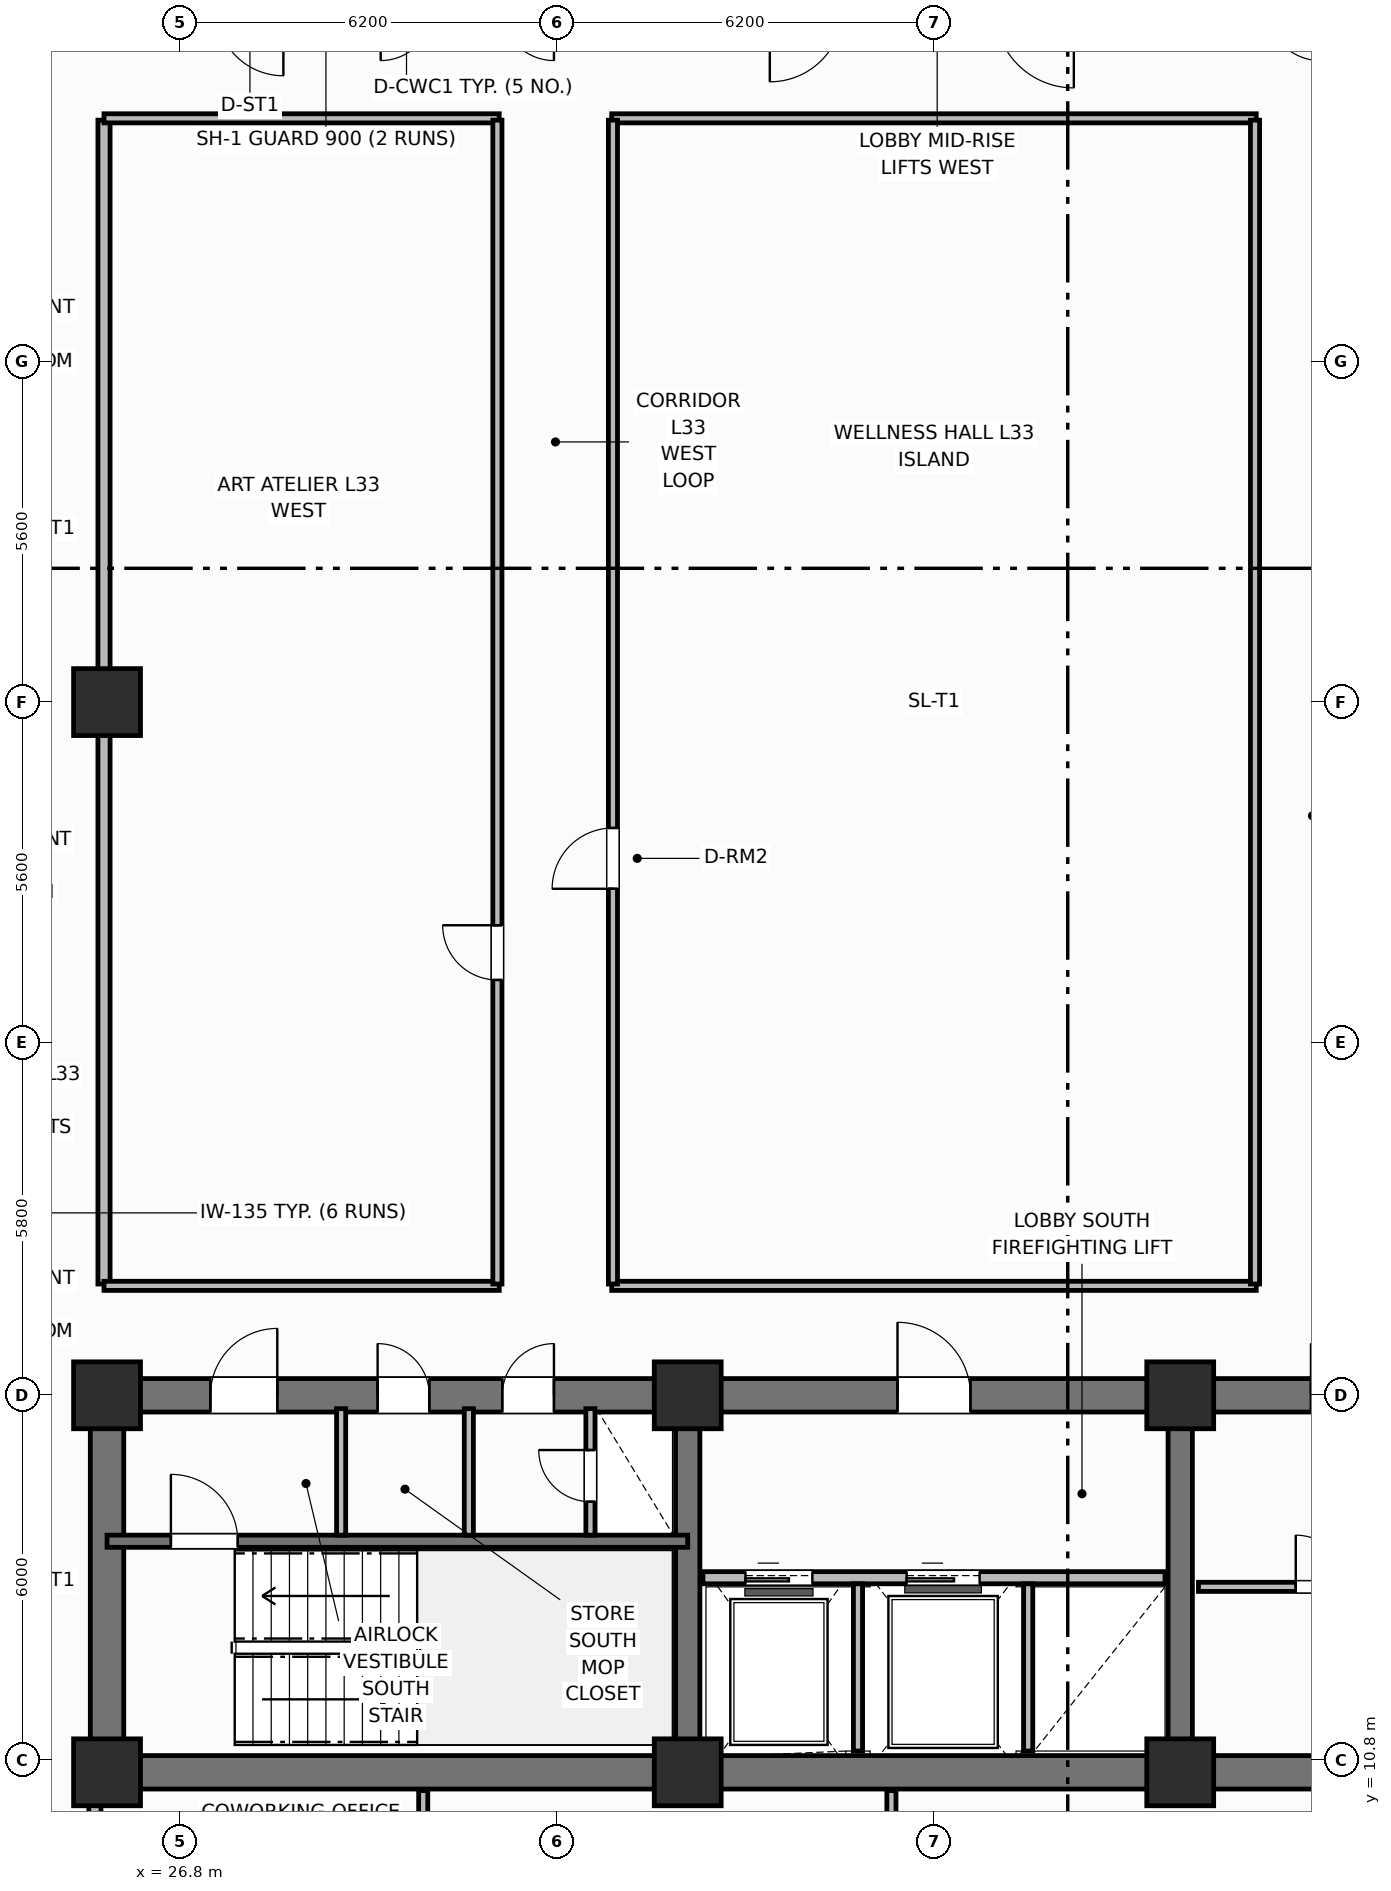
"""IFC4 building model, lengths in metres.
Left out: names, types, materials, properties, quantities, classifications, styles, units other than length and angle.
Written with IfcOpenShell. Run it as: python <this file> out.ifc"""

import sys

from ifc_helpers import new_model, si_unit, direction, frame, frame_2d, origin, origin_2d, place, context, subcontext, project, spatial, rectangle, extrude, element, fill, save


model = new_model("IFC4")
c1 = context("Model", 3, precision=1e-05, world=origin(), true_north=direction((0.0, 1.0)))
c2 = subcontext(c1, "Body", "Model", "MODEL_VIEW")
j1 = project(units=[si_unit("LENGTHUNIT", "METRE"), si_unit("PLANEANGLEUNIT", "RADIAN")], contexts=[c1])
p1 = place(None, origin())
s1 = spatial("IfcSite", under=j1, at=p1, CompositionType="ELEMENT")
p2 = place(p1, origin())
s2 = spatial("IfcBuilding", under=s1, at=p2, CompositionType="ELEMENT")
p3 = place(p2, frame((0.0, 0.0, 132.7)))
s3 = spatial("IfcBuildingStorey", under=s2, at=p3, CompositionType="ELEMENT", Elevation=132.7)
p4 = place(p3, frame((52.8, 10.6, 0.0), z_axis=(0.0, 0.0, 1.0), x_axis=(-1.0, 0.0, 0.0)))
e1 = element("IfcWall", 1, at=p4, inside=s3, PredefinedType="SHEAR", context=c2, shape_type="SweptSolid", body=[
    extrude(rectangle(XDim=27.2, YDim=0.55, at=frame_2d((13.6, 0.0))), origin(), (0.0, 0.0, 1.0), 3.7),
])
p5 = place(p3, frame((25.6, 10.875, 0.0), z_axis=(0.0, 0.0, 1.0), x_axis=(0.0, 1.0, 0.0)))
e2 = element("IfcWall", 2, at=p5, inside=s3, PredefinedType="SHEAR", context=c2, shape_type="SweptSolid", body=[
    extrude(rectangle(XDim=5.65, YDim=0.55, at=frame_2d((2.825, 0.0))), origin(), (0.0, 0.0, 1.0), 3.7),
])
p6 = place(p3, frame((25.6, 16.8, 0.0), z_axis=(0.0, 0.0, 1.0), x_axis=(1.0, 0.0, 0.0)))
e3 = element("IfcWall", 3, at=p6, inside=s3, PredefinedType="SHEAR", context=c2, shape_type="SweptSolid", body=[
    extrude(rectangle(XDim=27.2, YDim=0.55, at=frame_2d((13.6, 0.0))), origin(), (0.0, 0.0, 1.0), 3.7),
])
p7 = place(p6, frame((1.7, 0.0, 0.0)))
e4 = element("IfcOpeningElement", 4, at=p7, cuts=e3, PredefinedType="OPENING", context=c2, shape_type="SweptSolid", body=[
    extrude(rectangle(XDim=1.1, YDim=2.15, at=frame_2d((0.55, 1.075))), frame((0.0, 0.285, 0.0), z_axis=(0.0, -1.0, 0.0), x_axis=(1.0, 0.0, 0.0)), (0.0, 0.0, 1.0), 0.57),
])
p8 = place(p6, frame((4.45, 0.0, 0.0)))
e5 = element("IfcOpeningElement", 5, at=p8, cuts=e3, PredefinedType="OPENING", context=c2, shape_type="SweptSolid", body=[
    extrude(rectangle(XDim=0.85, YDim=2.1, at=frame_2d((0.425, 1.05))), frame((0.0, 0.285, 0.0), z_axis=(0.0, -1.0, 0.0), x_axis=(1.0, 0.0, 0.0)), (0.0, 0.0, 1.0), 0.57),
])
p9 = place(p6, frame((6.5, 0.0, 0.0)))
e6 = element("IfcOpeningElement", 6, at=p9, cuts=e3, PredefinedType="OPENING", context=c2, shape_type="SweptSolid", body=[
    extrude(rectangle(XDim=0.85, YDim=2.1, at=frame_2d((0.425, 1.05))), frame((0.0, 0.285, 0.0), z_axis=(0.0, -1.0, 0.0), x_axis=(1.0, 0.0, 0.0)), (0.0, 0.0, 1.0), 0.57),
])
p10 = place(p6, frame((13.0, 0.0, 0.0)))
e7 = element("IfcOpeningElement", 7, at=p10, cuts=e3, PredefinedType="OPENING", context=c2, shape_type="SweptSolid", body=[
    extrude(rectangle(XDim=1.2, YDim=2.15, at=frame_2d((0.6, 1.075))), frame((0.0, 0.285, 0.0), z_axis=(0.0, -1.0, 0.0), x_axis=(1.0, 0.0, 0.0)), (0.0, 0.0, 1.0), 0.57),
])
p11 = place(p6, frame((19.8, 0.0, 0.0)))
e8 = element("IfcOpeningElement", 8, at=p11, cuts=e3, PredefinedType="OPENING", context=c2, shape_type="SweptSolid", body=[
    extrude(rectangle(XDim=0.85, YDim=2.1, at=frame_2d((0.425, 1.05))), frame((0.0, 0.285, 0.0), z_axis=(0.0, -1.0, 0.0), x_axis=(1.0, 0.0, 0.0)), (0.0, 0.0, 1.0), 0.57),
])
p12 = place(p6, frame((24.2, 0.0, 0.0)))
e9 = element("IfcOpeningElement", 9, at=p12, cuts=e3, PredefinedType="OPENING", context=c2, shape_type="SweptSolid", body=[
    extrude(rectangle(XDim=0.85, YDim=2.1, at=frame_2d((0.425, 1.05))), frame((0.0, 0.285, 0.0), z_axis=(0.0, -1.0, 0.0), x_axis=(1.0, 0.0, 0.0)), (0.0, 0.0, 1.0), 0.57),
])
for number, where, z_axis, x_axis in (
    (10, (35.15, 10.875, 0.0), (0.0, 0.0, 1.0), (0.0, 1.0, 0.0)),
    (11, (43.25, 10.875, 0.0), (0.0, 0.0, 1.0), (0.0, 1.0, 0.0)),
):
    element("IfcWall", number, at=place(p3, frame(where, z_axis=z_axis, x_axis=x_axis)), inside=s3, PredefinedType="SHEAR", context=c2, shape_type="SweptSolid", body=[
        extrude(rectangle(XDim=5.65, YDim=0.4, at=frame_2d((2.825, 0.0))), origin(), (0.0, 0.0, 1.0), 3.7),
    ])
for number, where, z_axis, x_axis in (
    (12, (25.6, 10.6, 0.0), (0.0, 0.0, 1.0), (1.0, 0.0, 0.0)),
    (13, (25.6, 16.8, 0.0), (0.0, 0.0, 1.0), (1.0, 0.0, 0.0)),
    (14, (35.15, 10.6, 0.0), (0.0, 0.0, 1.0), (1.0, 0.0, 0.0)),
    (15, (35.15, 16.8, 0.0), (0.0, 0.0, 1.0), (1.0, 0.0, 0.0)),
    (16, (43.25, 10.6, 0.0), (0.0, 0.0, 1.0), (1.0, 0.0, 0.0)),
    (17, (43.25, 16.8, 0.0), (0.0, 0.0, 1.0), (1.0, 0.0, 0.0)),
    (18, (25.6, 28.2, 0.0), (0.0, 0.0, 1.0), (1.0, 0.0, 0.0)),
):
    element("IfcColumn", number, at=place(p3, frame(where, z_axis=z_axis, x_axis=x_axis)), inside=s3, PredefinedType="COLUMN", context=c2, shape_type="SweptSolid", body=[
        extrude(rectangle(XDim=1.1, YDim=1.1, at=origin_2d()), origin(), (0.0, 0.0, 1.0), 3.7),
    ])
p13 = place(p3, frame((25.6, 14.4, 0.0), z_axis=(0.0, 0.0, 1.0), x_axis=(1.0, 0.0, 0.0)))
e19 = element("IfcWall", 19, at=p13, inside=s3, PredefinedType="SHEAR", context=c2, shape_type="SweptSolid", body=[
    extrude(rectangle(XDim=9.55, YDim=0.2, at=frame_2d((4.775, 0.0))), origin(), (0.0, 0.0, 1.0), 3.7),
])
p14 = place(p13, frame((1.05, 0.0, 0.0)))
e20 = element("IfcOpeningElement", 20, at=p14, cuts=e19, PredefinedType="OPENING", context=c2, shape_type="SweptSolid", body=[
    extrude(rectangle(XDim=1.1, YDim=2.15, at=frame_2d((0.55, 1.075))), frame((0.0, 0.11, 0.0), z_axis=(0.0, -1.0, 0.0), x_axis=(1.0, 0.0, 0.0)), (0.0, 0.0, 1.0), 0.22),
])
for number, where, z_axis, x_axis in (
    (21, (29.45, 14.5, 0.0), (0.0, 0.0, 1.0), (0.0, 1.0, 0.0)),
    (22, (31.55, 14.5, 0.0), (0.0, 0.0, 1.0), (0.0, 1.0, 0.0)),
):
    element("IfcWall", number, at=place(p3, frame(where, z_axis=z_axis, x_axis=x_axis)), inside=s3, PredefinedType="PARTITIONING", context=c2, shape_type="SweptSolid", body=[
        extrude(rectangle(XDim=2.08, YDim=0.15, at=frame_2d((1.04, 0.0))), origin(), (0.0, 0.0, 1.0), 2.49),
    ])
p15 = place(p3, frame((33.55, 14.5, 0.0), z_axis=(0.0, 0.0, 1.0), x_axis=(0.0, 1.0, 0.0)))
e23 = element("IfcWall", 23, at=p15, inside=s3, PredefinedType="PARTITIONING", context=c2, shape_type="SweptSolid", body=[
    extrude(rectangle(XDim=2.08, YDim=0.15, at=frame_2d((1.04, 0.0))), origin(), (0.0, 0.0, 1.0), 2.49),
])
p16 = place(p15, frame((0.55, 0.0, 0.0)))
e24 = element("IfcOpeningElement", 24, at=p16, cuts=e23, PredefinedType="OPENING", context=c2, shape_type="SweptSolid", body=[
    extrude(rectangle(XDim=0.85, YDim=2.05, at=frame_2d((0.425, 1.025))), frame((0.0, 0.085, 0.0), z_axis=(0.0, -1.0, 0.0), x_axis=(1.0, 0.0, 0.0)), (0.0, 0.0, 1.0), 0.17),
])
p17 = place(p3, frame((35.4, 13.8, 0.0), z_axis=(0.0, 0.0, 1.0), x_axis=(1.0, 0.0, 0.0)))
e25 = element("IfcWall", 25, at=p17, inside=s3, PredefinedType="PARTITIONING", context=c2, shape_type="SweptSolid", body=[
    extrude(rectangle(XDim=7.6, YDim=0.2, at=frame_2d((3.8, 0.0))), origin(), (0.0, 0.0, 1.0), 2.26),
])
p18 = place(p17, frame((0.7, 0.0, 0.0)))
e26 = element("IfcOpeningElement", 26, at=p18, cuts=e25, PredefinedType="OPENING", context=c2, shape_type="SweptSolid", body=[
    extrude(rectangle(XDim=1.1, YDim=2.15, at=frame_2d((0.55, 1.075))), frame((0.0, 0.11, 0.0), z_axis=(0.0, -1.0, 0.0), x_axis=(1.0, 0.0, 0.0)), (0.0, 0.0, 1.0), 0.22),
])
p19 = place(p17, frame((3.35, 0.0, 0.0)))
e27 = element("IfcOpeningElement", 27, at=p19, cuts=e25, PredefinedType="OPENING", context=c2, shape_type="SweptSolid", body=[
    extrude(rectangle(XDim=1.2, YDim=2.15, at=frame_2d((0.6, 1.075))), frame((0.0, 0.11, 0.0), z_axis=(0.0, -1.0, 0.0), x_axis=(1.0, 0.0, 0.0)), (0.0, 0.0, 1.0), 0.22),
])
for number, where, z_axis, x_axis in (
    (28, (37.95, 10.95, 0.0), (0.0, 0.0, 1.0), (0.0, 1.0, 0.0)),
    (29, (40.75, 10.95, 0.0), (0.0, 0.0, 1.0), (0.0, 1.0, 0.0)),
):
    element("IfcWall", number, at=place(p3, frame(where, z_axis=z_axis, x_axis=x_axis)), inside=s3, PredefinedType="PARTITIONING", context=c2, shape_type="SweptSolid", body=[
        extrude(rectangle(XDim=2.75, YDim=0.15, at=frame_2d((1.375, 0.0))), origin(), (0.0, 0.0, 1.0), 2.49),
    ])
p20 = place(p3, frame((43.55, 13.65, 0.0), z_axis=(0.0, 0.0, 1.0), x_axis=(1.0, 0.0, 0.0)))
e30 = element("IfcWall", 30, at=p20, inside=s3, PredefinedType="PARTITIONING", context=c2, shape_type="SweptSolid", body=[
    extrude(rectangle(XDim=4.4, YDim=0.15, at=frame_2d((2.2, 0.0))), origin(), (0.0, 0.0, 1.0), 2.49),
])
p21 = place(p20, frame((1.6, 0.0, 0.0)))
e31 = element("IfcOpeningElement", 31, at=p21, cuts=e30, PredefinedType="OPENING", context=c2, shape_type="SweptSolid", body=[
    extrude(rectangle(XDim=0.85, YDim=2.1, at=frame_2d((0.425, 1.05))), frame((0.0, 0.085, 0.0), z_axis=(0.0, -1.0, 0.0), x_axis=(1.0, 0.0, 0.0)), (0.0, 0.0, 1.0), 0.17),
])
p22 = place(p3, frame((25.55, 18.63, 0.0), z_axis=(0.0, 0.0, 1.0), x_axis=(0.0, 1.0, 0.0)))
e32 = element("IfcWall", 32, at=p22, inside=s3, PredefinedType="PARTITIONING", context=c2, shape_type="SweptSolid", body=[
    extrude(rectangle(XDim=19.14, YDim=0.2, at=frame_2d((9.57, 0.0))), origin(), (0.0, 0.0, 1.0), 2.49),
])
for number, where, z_axis, x_axis in (
    (33, (25.55, 18.6, 0.0), (0.0, 0.0, 1.0), (1.0, 0.0, 0.0)),
    (34, (25.55, 37.8, 0.0), (0.0, 0.0, 1.0), (1.0, 0.0, 0.0)),
):
    element("IfcWall", number, at=place(p3, frame(where, z_axis=z_axis, x_axis=x_axis)), inside=s3, PredefinedType="PARTITIONING", context=c2, shape_type="SweptSolid", body=[
        extrude(rectangle(XDim=6.5, YDim=0.15, at=frame_2d((3.25, 0.0))), origin(), (0.0, 0.0, 1.0), 2.49),
    ])
for number, where, z_axis, x_axis in (
    (35, (33.9, 18.6, 0.0), (0.0, 0.0, 1.0), (1.0, 0.0, 0.0)),
    (36, (33.9, 37.8, 0.0), (0.0, 0.0, 1.0), (1.0, 0.0, 0.0)),
):
    element("IfcWall", number, at=place(p3, frame(where, z_axis=z_axis, x_axis=x_axis)), inside=s3, PredefinedType="PARTITIONING", context=c2, shape_type="SweptSolid", body=[
        extrude(rectangle(XDim=10.6, YDim=0.15, at=frame_2d((5.3, 0.0))), origin(), (0.0, 0.0, 1.0), 2.49),
    ])
p23 = place(p3, frame((32.02, 18.63, 0.0), z_axis=(0.0, 0.0, 1.0), x_axis=(0.0, 1.0, 0.0)))
e37 = element("IfcWall", 37, at=p23, inside=s3, PredefinedType="PARTITIONING", context=c2, shape_type="SweptSolid", body=[
    extrude(rectangle(XDim=19.14, YDim=0.15, at=frame_2d((9.57, 0.0))), origin(), (0.0, 0.0, 1.0), 2.49),
])
p24 = place(p23, frame((5.0, 0.0, 0.0)))
e38 = element("IfcOpeningElement", 38, at=p24, cuts=e37, PredefinedType="OPENING", context=c2, shape_type="SweptSolid", body=[
    extrude(rectangle(XDim=0.9, YDim=2.1, at=frame_2d((0.45, 1.05))), frame((0.0, 0.085, 0.0), z_axis=(0.0, -1.0, 0.0), x_axis=(1.0, 0.0, 0.0)), (0.0, 0.0, 1.0), 0.17),
])
p25 = place(p3, frame((33.92, 18.63, 0.0), z_axis=(0.0, 0.0, 1.0), x_axis=(0.0, 1.0, 0.0)))
e39 = element("IfcWall", 39, at=p25, inside=s3, PredefinedType="PARTITIONING", context=c2, shape_type="SweptSolid", body=[
    extrude(rectangle(XDim=19.14, YDim=0.15, at=frame_2d((9.57, 0.0))), origin(), (0.0, 0.0, 1.0), 2.49),
])
p26 = place(p25, frame((6.5, 0.0, 0.0)))
e40 = element("IfcOpeningElement", 40, at=p26, cuts=e39, PredefinedType="OPENING", context=c2, shape_type="SweptSolid", body=[
    extrude(rectangle(XDim=1.0, YDim=2.15, at=frame_2d((0.5, 1.075))), frame((0.0, 0.085, 0.0), z_axis=(0.0, -1.0, 0.0), x_axis=(1.0, 0.0, 0.0)), (0.0, 0.0, 1.0), 0.17),
])
p27 = place(p3, frame((44.48, 18.63, 0.0), z_axis=(0.0, 0.0, 1.0), x_axis=(0.0, 1.0, 0.0)))
e41 = element("IfcWall", 41, at=p27, inside=s3, PredefinedType="PARTITIONING", context=c2, shape_type="SweptSolid", body=[
    extrude(rectangle(XDim=19.14, YDim=0.15, at=frame_2d((9.57, 0.0))), origin(), (0.0, 0.0, 1.0), 2.49),
])
p28 = place(p3, frame((30.8, 4.97, 0.0), z_axis=(0.0, 0.0, 1.0), x_axis=(0.0, 1.0, 0.0)))
e42 = element("IfcWall", 42, at=p28, inside=s3, PredefinedType="PARTITIONING", context=c2, shape_type="SweptSolid", body=[
    extrude(rectangle(XDim=5.33, YDim=0.15, at=frame_2d((2.665, 0.0))), origin(), (0.0, 0.0, 1.0), 2.49),
])
p29 = place(p28, frame((1.85, 0.0, 0.0)))
e43 = element("IfcOpeningElement", 43, at=p29, cuts=e42, PredefinedType="OPENING", context=c2, shape_type="SweptSolid", body=[
    extrude(rectangle(XDim=0.9, YDim=2.1, at=frame_2d((0.45, 1.05))), frame((0.0, 0.085, 0.0), z_axis=(0.0, -1.0, 0.0), x_axis=(1.0, 0.0, 0.0)), (0.0, 0.0, 1.0), 0.17),
])
p30 = place(p3, frame((38.5, 4.97, 0.0), z_axis=(0.0, 0.0, 1.0), x_axis=(0.0, 1.0, 0.0)))
e44 = element("IfcWall", 44, at=p30, inside=s3, PredefinedType="PARTITIONING", context=c2, shape_type="SweptSolid", body=[
    extrude(rectangle(XDim=5.33, YDim=0.15, at=frame_2d((2.665, 0.0))), origin(), (0.0, 0.0, 1.0), 2.49),
])
p31 = place(p3, frame((25.4, 6.17, 0.0), z_axis=(0.0, 0.0, 1.0), x_axis=(0.0, 1.0, 0.0)))
e45 = element("IfcWall", 45, at=p31, inside=s3, PredefinedType="PARTITIONING", context=c2, shape_type="SweptSolid", body=[
    extrude(rectangle(XDim=4.13, YDim=0.2, at=frame_2d((2.065, 0.0))), origin(), (0.0, 0.0, 1.0), 2.49),
])
p32 = place(p31, frame((0.65, 0.0, 0.0)))
e46 = element("IfcOpeningElement", 46, at=p32, cuts=e45, PredefinedType="OPENING", context=c2, shape_type="SweptSolid", body=[
    extrude(rectangle(XDim=0.9, YDim=2.1, at=frame_2d((0.45, 1.05))), frame((0.0, 0.11, 0.0), z_axis=(0.0, -1.0, 0.0), x_axis=(1.0, 0.0, 0.0)), (0.0, 0.0, 1.0), 0.22),
])
p33 = place(p14, origin())
e47 = element("IfcDoor", 47, at=p33, inside=s3, OperationType="SINGLE_SWING_LEFT", PredefinedType="DOOR", context=c2, shape_type="SweptSolid", body=[
    extrude(rectangle(XDim=1.1, YDim=2.15, at=frame_2d((0.55, 1.075))), frame((0.0, 0.025, 0.0), z_axis=(0.0, -1.0, 0.0), x_axis=(1.0, 0.0, 0.0)), (0.0, 0.0, 1.0), 0.05),
])
fill(e20, e47)
p34 = place(p16, origin())
e48 = element("IfcDoor", 48, at=p34, inside=s3, OperationType="SINGLE_SWING_RIGHT", PredefinedType="TRAPDOOR", context=c2, shape_type="SweptSolid", body=[
    extrude(rectangle(XDim=0.85, YDim=2.05, at=frame_2d((0.425, 1.025))), frame((0.0, 0.025, 0.0), z_axis=(0.0, -1.0, 0.0), x_axis=(1.0, 0.0, 0.0)), (0.0, 0.0, 1.0), 0.05),
])
fill(e24, e48)
p35 = place(p18, origin())
e49 = element("IfcDoor", 49, at=p35, inside=s3, OperationType="SLIDING_TO_LEFT", PredefinedType="DOOR", context=c2, shape_type="SweptSolid", body=[
    extrude(rectangle(XDim=1.1, YDim=2.15, at=frame_2d((0.55, 1.075))), frame((0.0, 0.025, 0.0), z_axis=(0.0, -1.0, 0.0), x_axis=(1.0, 0.0, 0.0)), (0.0, 0.0, 1.0), 0.05),
])
fill(e26, e49)
p36 = place(p19, origin())
e50 = element("IfcDoor", 50, at=p36, inside=s3, OperationType="SLIDING_TO_LEFT", PredefinedType="DOOR", context=c2, shape_type="SweptSolid", body=[
    extrude(rectangle(XDim=1.2, YDim=2.15, at=frame_2d((0.6, 1.075))), frame((0.0, 0.025, 0.0), z_axis=(0.0, -1.0, 0.0), x_axis=(1.0, 0.0, 0.0)), (0.0, 0.0, 1.0), 0.05),
])
fill(e27, e50)
p37 = place(p21, origin())
e51 = element("IfcDoor", 51, at=p37, inside=s3, OperationType="SINGLE_SWING_LEFT", PredefinedType="DOOR", context=c2, shape_type="SweptSolid", body=[
    extrude(rectangle(XDim=0.85, YDim=2.1, at=frame_2d((0.425, 1.05))), frame((0.0, 0.025, 0.0), z_axis=(0.0, -1.0, 0.0), x_axis=(1.0, 0.0, 0.0)), (0.0, 0.0, 1.0), 0.05),
])
fill(e31, e51)
p38 = place(p24, origin())
e52 = element("IfcDoor", 52, at=p38, inside=s3, OperationType="SINGLE_SWING_RIGHT", PredefinedType="DOOR", context=c2, shape_type="SweptSolid", body=[
    extrude(rectangle(XDim=0.9, YDim=2.1, at=frame_2d((0.45, 1.05))), frame((0.0, 0.025, 0.0), z_axis=(0.0, -1.0, 0.0), x_axis=(1.0, 0.0, 0.0)), (0.0, 0.0, 1.0), 0.05),
])
fill(e38, e52)
p39 = place(p26, origin())
e53 = element("IfcDoor", 53, at=p39, inside=s3, OperationType="SINGLE_SWING_LEFT", PredefinedType="DOOR", context=c2, shape_type="SweptSolid", body=[
    extrude(rectangle(XDim=1.0, YDim=2.15, at=frame_2d((0.5, 1.075))), frame((0.0, 0.025, 0.0), z_axis=(0.0, -1.0, 0.0), x_axis=(1.0, 0.0, 0.0)), (0.0, 0.0, 1.0), 0.05),
])
fill(e40, e53)
p40 = place(p7, origin())
e54 = element("IfcDoor", 54, at=p40, inside=s3, OperationType="SINGLE_SWING_RIGHT", PredefinedType="DOOR", context=c2, shape_type="SweptSolid", body=[
    extrude(rectangle(XDim=1.1, YDim=2.15, at=frame_2d((0.55, 1.075))), frame((0.0, 0.025, 0.0), z_axis=(0.0, -1.0, 0.0), x_axis=(1.0, 0.0, 0.0)), (0.0, 0.0, 1.0), 0.05),
])
fill(e4, e54)
p41 = place(p8, origin())
e55 = element("IfcDoor", 55, at=p41, inside=s3, OperationType="SINGLE_SWING_LEFT", PredefinedType="DOOR", context=c2, shape_type="SweptSolid", body=[
    extrude(rectangle(XDim=0.85, YDim=2.1, at=frame_2d((0.425, 1.05))), frame((0.0, 0.025, 0.0), z_axis=(0.0, -1.0, 0.0), x_axis=(1.0, 0.0, 0.0)), (0.0, 0.0, 1.0), 0.05),
])
fill(e5, e55)
p42 = place(p9, origin())
e56 = element("IfcDoor", 56, at=p42, inside=s3, OperationType="SINGLE_SWING_RIGHT", PredefinedType="DOOR", context=c2, shape_type="SweptSolid", body=[
    extrude(rectangle(XDim=0.85, YDim=2.1, at=frame_2d((0.425, 1.05))), frame((0.0, 0.025, 0.0), z_axis=(0.0, -1.0, 0.0), x_axis=(1.0, 0.0, 0.0)), (0.0, 0.0, 1.0), 0.05),
])
fill(e6, e56)
p43 = place(p10, origin())
e57 = element("IfcDoor", 57, at=p43, inside=s3, OperationType="SINGLE_SWING_LEFT", PredefinedType="DOOR", context=c2, shape_type="SweptSolid", body=[
    extrude(rectangle(XDim=1.2, YDim=2.15, at=frame_2d((0.6, 1.075))), frame((0.0, 0.025, 0.0), z_axis=(0.0, -1.0, 0.0), x_axis=(1.0, 0.0, 0.0)), (0.0, 0.0, 1.0), 0.05),
])
fill(e7, e57)
save(model, sys.argv[1])
